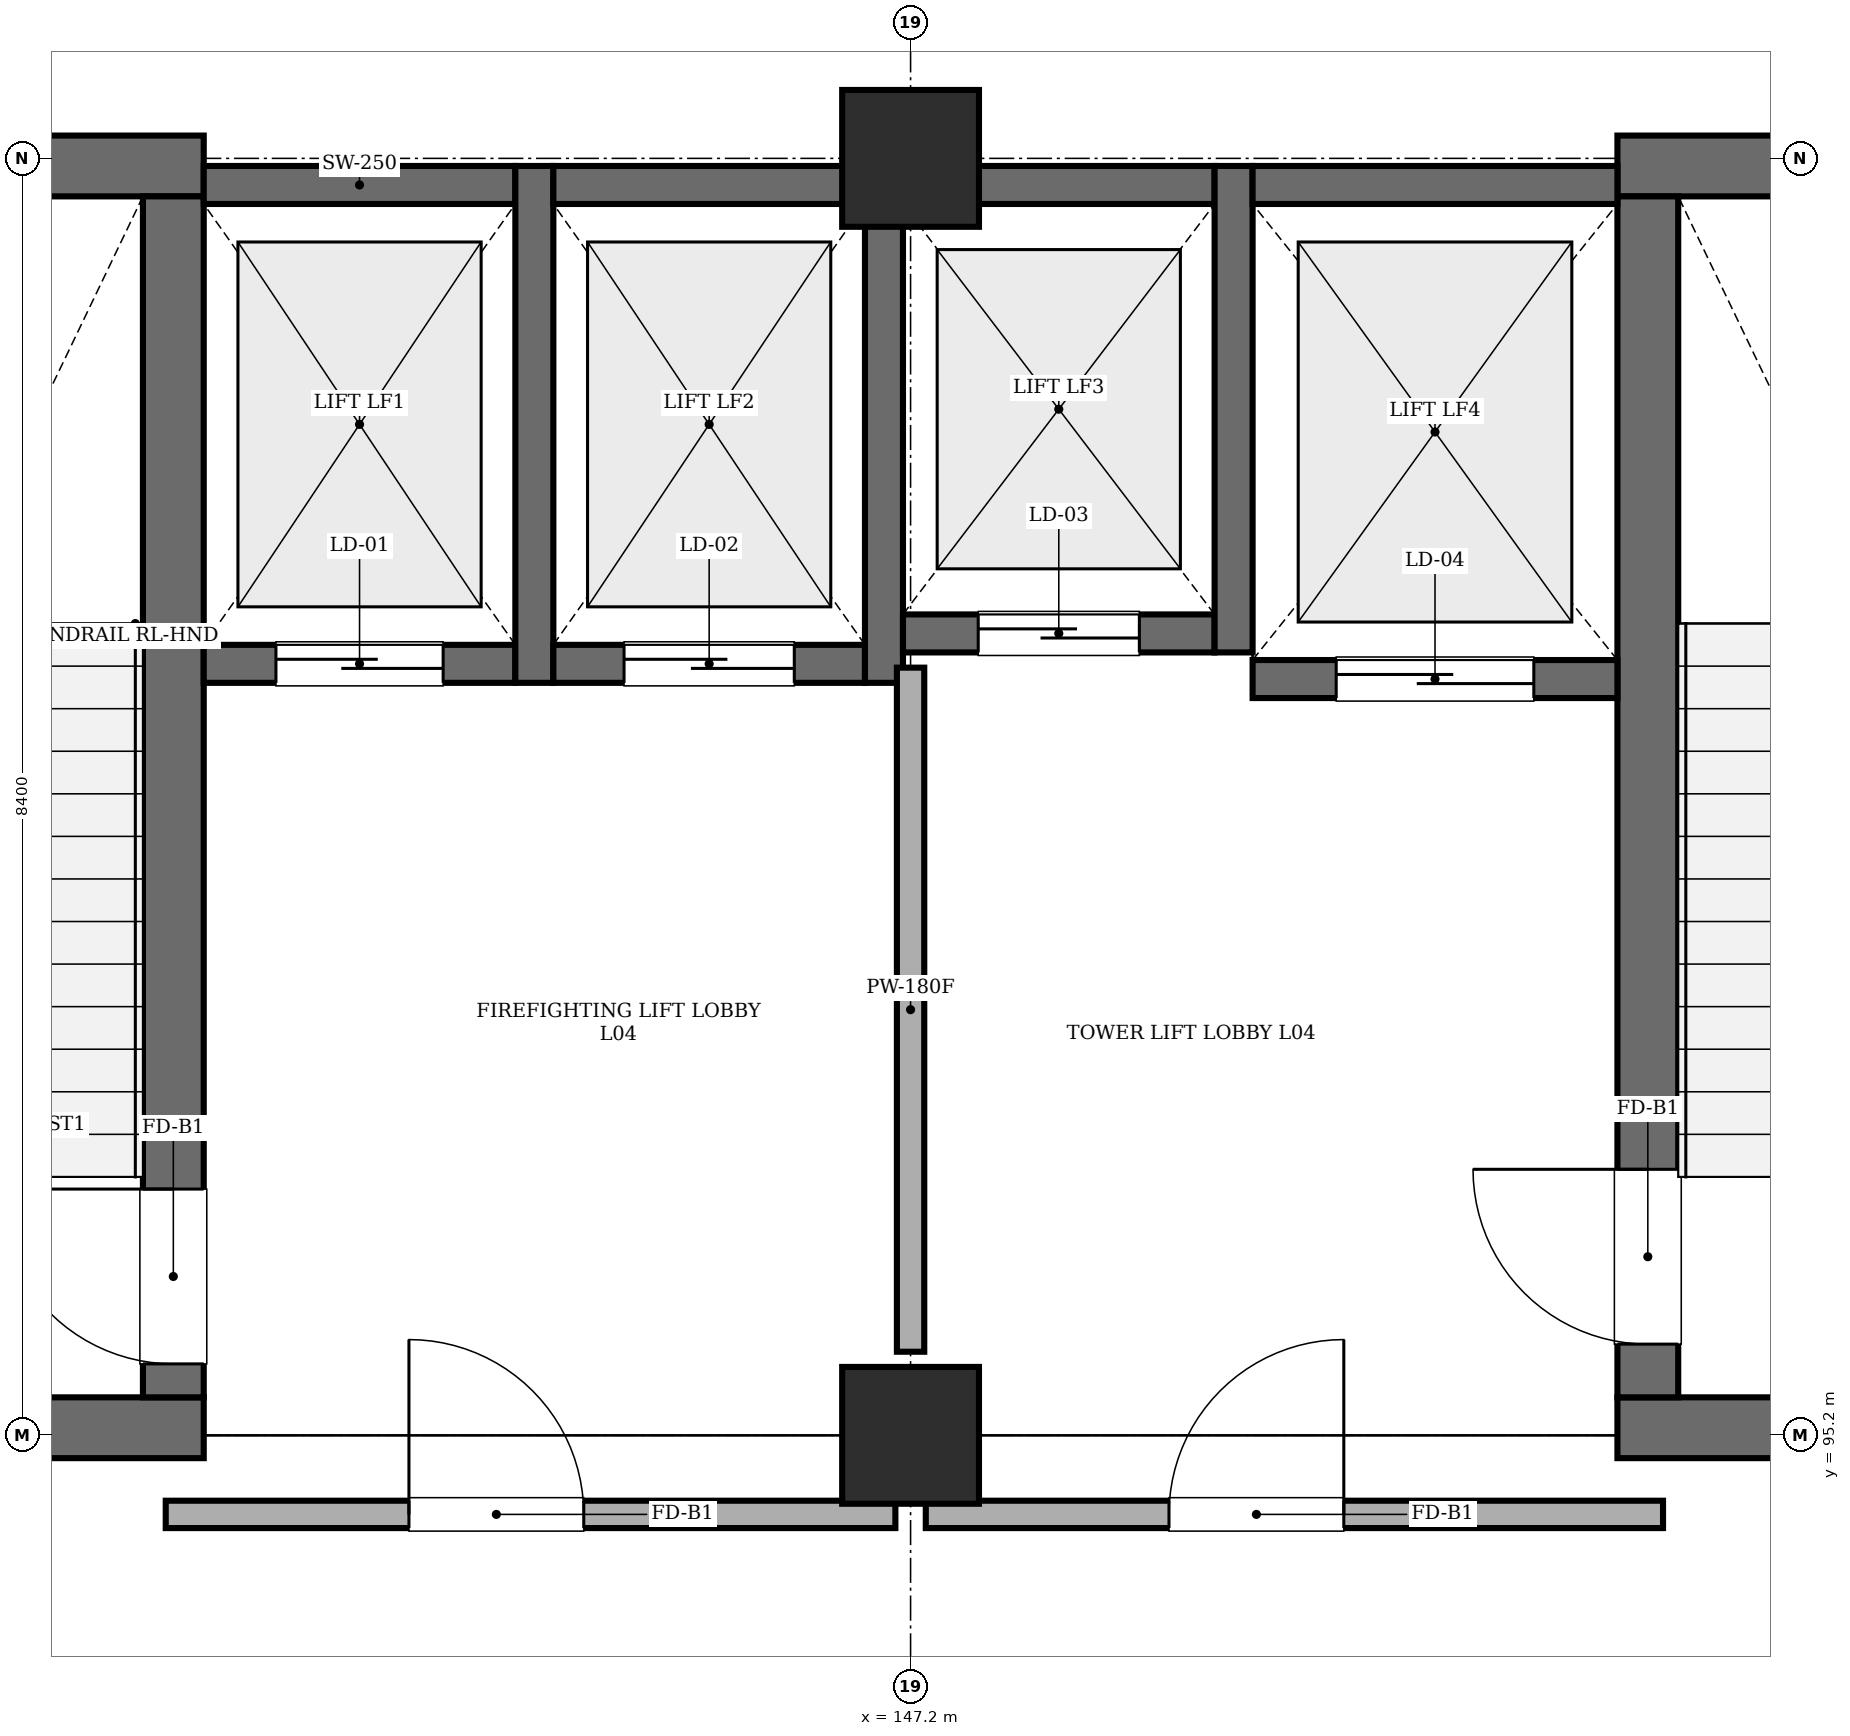
"""IFC4 building model, lengths in metres.
Left out: names, types, materials, properties, quantities, classifications, styles, units other than length and angle.
Written with IfcOpenShell. Run it as: python <this file> out.ifc"""

import sys

from ifc_helpers import new_model, si_unit, direction, frame, frame_2d, origin, origin_2d, place, context, subcontext, project, spatial, rectangle, extrude, element, fill, save


model = new_model("IFC4")
c1 = context("Model", 3, precision=1e-05, world=origin(), true_north=direction((0.0, 1.0)))
c2 = subcontext(c1, "Body", "Model", "MODEL_VIEW")
j1 = project(units=[si_unit("LENGTHUNIT", "METRE"), si_unit("PLANEANGLEUNIT", "RADIAN")], contexts=[c1])
p1 = place(None, origin())
s1 = spatial("IfcSite", under=j1, at=p1, CompositionType="ELEMENT")
p2 = place(p1, origin())
s2 = spatial("IfcBuilding", under=s1, at=p2, CompositionType="ELEMENT")
p3 = place(p2, frame((0.0, 0.0, 14.7)))
s3 = spatial("IfcBuildingStorey", under=s2, at=p3, CompositionType="ELEMENT", Elevation=14.7)
for number, where, z_axis, x_axis in (
    (1, (147.2, 95.2, 0.0), (0.0, 0.0, 1.0), (1.0, 0.0, 0.0)),
    (2, (147.2, 103.6, 0.0), (0.0, 0.0, 1.0), (1.0, 0.0, 0.0)),
):
    element("IfcColumn", number, at=place(p3, frame(where, z_axis=z_axis, x_axis=x_axis)), inside=s3, PredefinedType="COLUMN", context=c2, shape_type="SweptSolid", body=[
        extrude(rectangle(XDim=0.9, YDim=0.9, at=origin_2d()), origin(), (0.0, 0.0, 1.0), 4.26),
    ])
for number, where, z_axis, x_axis in (
    (3, (138.65, 95.25, 0.0), (0.0, 0.0, 1.0), (1.0, 0.0, 0.0)),
    (4, (138.65, 103.55, 0.0), (0.0, 0.0, 1.0), (1.0, 0.0, 0.0)),
):
    element("IfcWall", number, at=place(p3, frame(where, z_axis=z_axis, x_axis=x_axis)), inside=s3, PredefinedType="SHEAR", context=c2, shape_type="SweptSolid", body=[
        extrude(rectangle(XDim=3.9, YDim=0.4, at=frame_2d((1.95, 0.0))), origin(), (0.0, 0.0, 1.0), 4.26),
    ])
p4 = place(p3, frame((142.35, 95.45, 0.0), z_axis=(0.0, 0.0, 1.0), x_axis=(0.0, 1.0, 0.0)))
e5 = element("IfcWall", 5, at=p4, inside=s3, PredefinedType="SHEAR", context=c2, shape_type="SweptSolid", body=[
    extrude(rectangle(XDim=7.9, YDim=0.4, at=frame_2d((3.95, 0.0))), origin(), (0.0, 0.0, 1.0), 4.26),
])
p5 = place(p4, frame((0.22, 0.0, 0.0)))
e6 = element("IfcOpeningElement", 6, at=p5, cuts=e5, PredefinedType="OPENING", context=c2, shape_type="SweptSolid", body=[
    extrude(rectangle(XDim=1.15, YDim=2.15, at=frame_2d((0.575, 1.075))), frame((0.0, 0.21, 0.0), z_axis=(0.0, -1.0, 0.0), x_axis=(1.0, 0.0, 0.0)), (0.0, 0.0, 1.0), 0.42),
])
for number, where, z_axis, x_axis in (
    (7, (151.85, 95.25, 0.0), (0.0, 0.0, 1.0), (1.0, 0.0, 0.0)),
    (8, (151.85, 103.55, 0.0), (0.0, 0.0, 1.0), (1.0, 0.0, 0.0)),
):
    element("IfcWall", number, at=place(p3, frame(where, z_axis=z_axis, x_axis=x_axis)), inside=s3, PredefinedType="SHEAR", context=c2, shape_type="SweptSolid", body=[
        extrude(rectangle(XDim=3.9, YDim=0.4, at=frame_2d((1.95, 0.0))), origin(), (0.0, 0.0, 1.0), 4.26),
    ])
p6 = place(p3, frame((152.05, 95.45, 0.0), z_axis=(0.0, 0.0, 1.0), x_axis=(0.0, 1.0, 0.0)))
e9 = element("IfcWall", 9, at=p6, inside=s3, PredefinedType="SHEAR", context=c2, shape_type="SweptSolid", body=[
    extrude(rectangle(XDim=7.9, YDim=0.4, at=frame_2d((3.95, 0.0))), origin(), (0.0, 0.0, 1.0), 4.26),
])
p7 = place(p6, frame((0.35, 0.0, 0.0)))
e10 = element("IfcOpeningElement", 10, at=p7, cuts=e9, PredefinedType="OPENING", context=c2, shape_type="SweptSolid", body=[
    extrude(rectangle(XDim=1.15, YDim=2.15, at=frame_2d((0.575, 1.075))), frame((0.0, 0.21, 0.0), z_axis=(0.0, -1.0, 0.0), x_axis=(1.0, 0.0, 0.0)), (0.0, 0.0, 1.0), 0.42),
])
p8 = place(p3, frame((142.55, 100.275, 0.0), z_axis=(0.0, 0.0, 1.0), x_axis=(1.0, 0.0, 0.0)))
e11 = element("IfcWall", 11, at=p8, inside=s3, PredefinedType="SHEAR", context=c2, shape_type="SweptSolid", body=[
    extrude(rectangle(XDim=2.05, YDim=0.25, at=frame_2d((1.025, 0.0))), origin(), (0.0, 0.0, 1.0), 4.26),
])
p9 = place(p8, frame((0.475, 0.0, 0.0)))
e12 = element("IfcOpeningElement", 12, at=p9, cuts=e11, PredefinedType="OPENING", context=c2, shape_type="SweptSolid", body=[
    extrude(rectangle(XDim=1.1, YDim=2.15, at=frame_2d((0.55, 1.075))), frame((0.0, 0.135, 0.0), z_axis=(0.0, -1.0, 0.0), x_axis=(1.0, 0.0, 0.0)), (0.0, 0.0, 1.0), 0.27),
])
p10 = place(p3, frame((142.55, 103.425, 0.0), z_axis=(0.0, 0.0, 1.0), x_axis=(1.0, 0.0, 0.0)))
e13 = element("IfcWall", 13, at=p10, inside=s3, PredefinedType="SHEAR", context=c2, shape_type="SweptSolid", body=[
    extrude(rectangle(XDim=2.05, YDim=0.25, at=frame_2d((1.025, 0.0))), origin(), (0.0, 0.0, 1.0), 4.26),
])
p11 = place(p3, frame((144.725, 100.15, 0.0), z_axis=(0.0, 0.0, 1.0), x_axis=(0.0, 1.0, 0.0)))
e14 = element("IfcWall", 14, at=p11, inside=s3, PredefinedType="SHEAR", context=c2, shape_type="SweptSolid", body=[
    extrude(rectangle(XDim=3.4, YDim=0.25, at=frame_2d((1.7, 0.0))), origin(), (0.0, 0.0, 1.0), 4.26),
])
p12 = place(p3, frame((144.85, 100.275, 0.0), z_axis=(0.0, 0.0, 1.0), x_axis=(1.0, 0.0, 0.0)))
e15 = element("IfcWall", 15, at=p12, inside=s3, PredefinedType="SHEAR", context=c2, shape_type="SweptSolid", body=[
    extrude(rectangle(XDim=2.05, YDim=0.25, at=frame_2d((1.025, 0.0))), origin(), (0.0, 0.0, 1.0), 4.26),
])
p13 = place(p12, frame((0.465, 0.0, 0.0)))
e16 = element("IfcOpeningElement", 16, at=p13, cuts=e15, PredefinedType="OPENING", context=c2, shape_type="SweptSolid", body=[
    extrude(rectangle(XDim=1.12, YDim=2.15, at=frame_2d((0.56, 1.075))), frame((0.0, 0.135, 0.0), z_axis=(0.0, -1.0, 0.0), x_axis=(1.0, 0.0, 0.0)), (0.0, 0.0, 1.0), 0.27),
])
p14 = place(p3, frame((144.85, 103.425, 0.0), z_axis=(0.0, 0.0, 1.0), x_axis=(1.0, 0.0, 0.0)))
e17 = element("IfcWall", 17, at=p14, inside=s3, PredefinedType="SHEAR", context=c2, shape_type="SweptSolid", body=[
    extrude(rectangle(XDim=2.05, YDim=0.25, at=frame_2d((1.025, 0.0))), origin(), (0.0, 0.0, 1.0), 4.26),
])
p15 = place(p3, frame((147.025, 100.15, 0.0), z_axis=(0.0, 0.0, 1.0), x_axis=(0.0, 1.0, 0.0)))
e18 = element("IfcWall", 18, at=p15, inside=s3, PredefinedType="SHEAR", context=c2, shape_type="SweptSolid", body=[
    extrude(rectangle(XDim=3.4, YDim=0.25, at=frame_2d((1.7, 0.0))), origin(), (0.0, 0.0, 1.0), 4.26),
])
p16 = place(p3, frame((147.15, 100.475, 0.0), z_axis=(0.0, 0.0, 1.0), x_axis=(1.0, 0.0, 0.0)))
e19 = element("IfcWall", 19, at=p16, inside=s3, PredefinedType="SHEAR", context=c2, shape_type="SweptSolid", body=[
    extrude(rectangle(XDim=2.05, YDim=0.25, at=frame_2d((1.025, 0.0))), origin(), (0.0, 0.0, 1.0), 4.26),
])
p17 = place(p16, frame((0.495, 0.0, 0.0)))
e20 = element("IfcOpeningElement", 20, at=p17, cuts=e19, PredefinedType="OPENING", context=c2, shape_type="SweptSolid", body=[
    extrude(rectangle(XDim=1.06, YDim=2.15, at=frame_2d((0.53, 1.075))), frame((0.0, 0.135, 0.0), z_axis=(0.0, -1.0, 0.0), x_axis=(1.0, 0.0, 0.0)), (0.0, 0.0, 1.0), 0.27),
])
p18 = place(p3, frame((147.15, 103.425, 0.0), z_axis=(0.0, 0.0, 1.0), x_axis=(1.0, 0.0, 0.0)))
e21 = element("IfcWall", 21, at=p18, inside=s3, PredefinedType="SHEAR", context=c2, shape_type="SweptSolid", body=[
    extrude(rectangle(XDim=2.05, YDim=0.25, at=frame_2d((1.025, 0.0))), origin(), (0.0, 0.0, 1.0), 4.26),
])
p19 = place(p3, frame((149.325, 100.35, 0.0), z_axis=(0.0, 0.0, 1.0), x_axis=(0.0, 1.0, 0.0)))
e22 = element("IfcWall", 22, at=p19, inside=s3, PredefinedType="SHEAR", context=c2, shape_type="SweptSolid", body=[
    extrude(rectangle(XDim=3.2, YDim=0.25, at=frame_2d((1.6, 0.0))), origin(), (0.0, 0.0, 1.0), 4.26),
])
p20 = place(p3, frame((149.45, 100.175, 0.0), z_axis=(0.0, 0.0, 1.0), x_axis=(1.0, 0.0, 0.0)))
e23 = element("IfcWall", 23, at=p20, inside=s3, PredefinedType="SHEAR", context=c2, shape_type="SweptSolid", body=[
    extrude(rectangle(XDim=2.4, YDim=0.25, at=frame_2d((1.2, 0.0))), origin(), (0.0, 0.0, 1.0), 4.26),
])
p21 = place(p20, frame((0.55, 0.0, 0.0)))
e24 = element("IfcOpeningElement", 24, at=p21, cuts=e23, PredefinedType="OPENING", context=c2, shape_type="SweptSolid", body=[
    extrude(rectangle(XDim=1.3, YDim=2.25, at=frame_2d((0.65, 1.125))), frame((0.0, 0.135, 0.0), z_axis=(0.0, -1.0, 0.0), x_axis=(1.0, 0.0, 0.0)), (0.0, 0.0, 1.0), 0.27),
])
p22 = place(p3, frame((149.45, 103.425, 0.0), z_axis=(0.0, 0.0, 1.0), x_axis=(1.0, 0.0, 0.0)))
e25 = element("IfcWall", 25, at=p22, inside=s3, PredefinedType="SHEAR", context=c2, shape_type="SweptSolid", body=[
    extrude(rectangle(XDim=2.4, YDim=0.25, at=frame_2d((1.2, 0.0))), origin(), (0.0, 0.0, 1.0), 4.26),
])
p23 = place(p3, frame((142.3, 94.68, 0.0), z_axis=(0.0, 0.0, 1.0), x_axis=(1.0, 0.0, 0.0)))
e26 = element("IfcWall", 26, at=p23, inside=s3, PredefinedType="STANDARD", context=c2, shape_type="SweptSolid", body=[
    extrude(rectangle(XDim=4.8, YDim=0.18, at=frame_2d((2.4, 0.0))), origin(), (0.0, 0.0, 1.0), 4.26),
])
p24 = place(p23, frame((1.6, 0.0, 0.0)))
e27 = element("IfcOpeningElement", 27, at=p24, cuts=e26, PredefinedType="OPENING", context=c2, shape_type="SweptSolid", body=[
    extrude(rectangle(XDim=1.15, YDim=2.15, at=frame_2d((0.575, 1.075))), frame((0.0, 0.1, 0.0), z_axis=(0.0, -1.0, 0.0), x_axis=(1.0, 0.0, 0.0)), (0.0, 0.0, 1.0), 0.2),
])
p25 = place(p3, frame((147.3, 94.68, 0.0), z_axis=(0.0, 0.0, 1.0), x_axis=(1.0, 0.0, 0.0)))
e28 = element("IfcWall", 28, at=p25, inside=s3, PredefinedType="STANDARD", context=c2, shape_type="SweptSolid", body=[
    extrude(rectangle(XDim=4.85, YDim=0.18, at=frame_2d((2.425, 0.0))), origin(), (0.0, 0.0, 1.0), 4.26),
])
p26 = place(p25, frame((1.6, 0.0, 0.0)))
e29 = element("IfcOpeningElement", 29, at=p26, cuts=e28, PredefinedType="OPENING", context=c2, shape_type="SweptSolid", body=[
    extrude(rectangle(XDim=1.15, YDim=2.15, at=frame_2d((0.575, 1.075))), frame((0.0, 0.1, 0.0), z_axis=(0.0, -1.0, 0.0), x_axis=(1.0, 0.0, 0.0)), (0.0, 0.0, 1.0), 0.2),
])
p27 = place(p3, frame((147.2, 95.75, 0.0), z_axis=(0.0, 0.0, 1.0), x_axis=(0.0, 1.0, 0.0)))
e30 = element("IfcWall", 30, at=p27, inside=s3, PredefinedType="STANDARD", context=c2, shape_type="SweptSolid", body=[
    extrude(rectangle(XDim=4.5, YDim=0.18, at=frame_2d((2.25, 0.0))), origin(), (0.0, 0.0, 1.0), 3.51),
])
p28 = place(p24, origin())
e31 = element("IfcDoor", 31, at=p28, inside=s3, OperationType="SINGLE_SWING_LEFT", PredefinedType="DOOR", context=c2, shape_type="SweptSolid", body=[
    extrude(rectangle(XDim=1.15, YDim=2.15, at=frame_2d((0.575, 1.075))), frame((0.0, 0.025, 0.0), z_axis=(0.0, -1.0, 0.0), x_axis=(1.0, 0.0, 0.0)), (0.0, 0.0, 1.0), 0.05),
])
fill(e27, e31)
p29 = place(p26, origin())
e32 = element("IfcDoor", 32, at=p29, inside=s3, OperationType="SINGLE_SWING_RIGHT", PredefinedType="DOOR", context=c2, shape_type="SweptSolid", body=[
    extrude(rectangle(XDim=1.15, YDim=2.15, at=frame_2d((0.575, 1.075))), frame((0.0, 0.025, 0.0), z_axis=(0.0, -1.0, 0.0), x_axis=(1.0, 0.0, 0.0)), (0.0, 0.0, 1.0), 0.05),
])
fill(e29, e32)
p30 = place(p5, origin())
e33 = element("IfcDoor", 33, at=p30, inside=s3, OperationType="SINGLE_SWING_RIGHT", PredefinedType="DOOR", context=c2, shape_type="SweptSolid", body=[
    extrude(rectangle(XDim=1.15, YDim=2.15, at=frame_2d((0.575, 1.075))), frame((0.0, 0.025, 0.0), z_axis=(0.0, -1.0, 0.0), x_axis=(1.0, 0.0, 0.0)), (0.0, 0.0, 1.0), 0.05),
])
fill(e6, e33)
p31 = place(p7, origin())
e34 = element("IfcDoor", 34, at=p31, inside=s3, OperationType="SINGLE_SWING_RIGHT", PredefinedType="DOOR", context=c2, shape_type="SweptSolid", body=[
    extrude(rectangle(XDim=1.15, YDim=2.15, at=frame_2d((0.575, 1.075))), frame((0.0, 0.025, 0.0), z_axis=(0.0, -1.0, 0.0), x_axis=(1.0, 0.0, 0.0)), (0.0, 0.0, 1.0), 0.05),
])
fill(e10, e34)
p32 = place(p9, origin())
e35 = element("IfcDoor", 35, at=p32, inside=s3, OperationType="SLIDING_TO_LEFT", PredefinedType="DOOR", context=c2, shape_type="SweptSolid", body=[
    extrude(rectangle(XDim=1.1, YDim=2.15, at=frame_2d((0.55, 1.075))), frame((0.0, 0.025, 0.0), z_axis=(0.0, -1.0, 0.0), x_axis=(1.0, 0.0, 0.0)), (0.0, 0.0, 1.0), 0.05),
])
fill(e12, e35)
p33 = place(p13, origin())
e36 = element("IfcDoor", 36, at=p33, inside=s3, OperationType="SLIDING_TO_LEFT", PredefinedType="DOOR", context=c2, shape_type="SweptSolid", body=[
    extrude(rectangle(XDim=1.12, YDim=2.15, at=frame_2d((0.56, 1.075))), frame((0.0, 0.025, 0.0), z_axis=(0.0, -1.0, 0.0), x_axis=(1.0, 0.0, 0.0)), (0.0, 0.0, 1.0), 0.05),
])
fill(e16, e36)
p34 = place(p17, origin())
e37 = element("IfcDoor", 37, at=p34, inside=s3, OperationType="SLIDING_TO_LEFT", PredefinedType="DOOR", context=c2, shape_type="SweptSolid", body=[
    extrude(rectangle(XDim=1.06, YDim=2.15, at=frame_2d((0.53, 1.075))), frame((0.0, 0.025, 0.0), z_axis=(0.0, -1.0, 0.0), x_axis=(1.0, 0.0, 0.0)), (0.0, 0.0, 1.0), 0.05),
])
fill(e20, e37)
p35 = place(p21, origin())
e38 = element("IfcDoor", 38, at=p35, inside=s3, OperationType="SLIDING_TO_LEFT", PredefinedType="DOOR", context=c2, shape_type="SweptSolid", body=[
    extrude(rectangle(XDim=1.3, YDim=2.25, at=frame_2d((0.65, 1.125))), frame((0.0, 0.025, 0.0), z_axis=(0.0, -1.0, 0.0), x_axis=(1.0, 0.0, 0.0)), (0.0, 0.0, 1.0), 0.05),
])
fill(e24, e38)
save(model, sys.argv[1])
